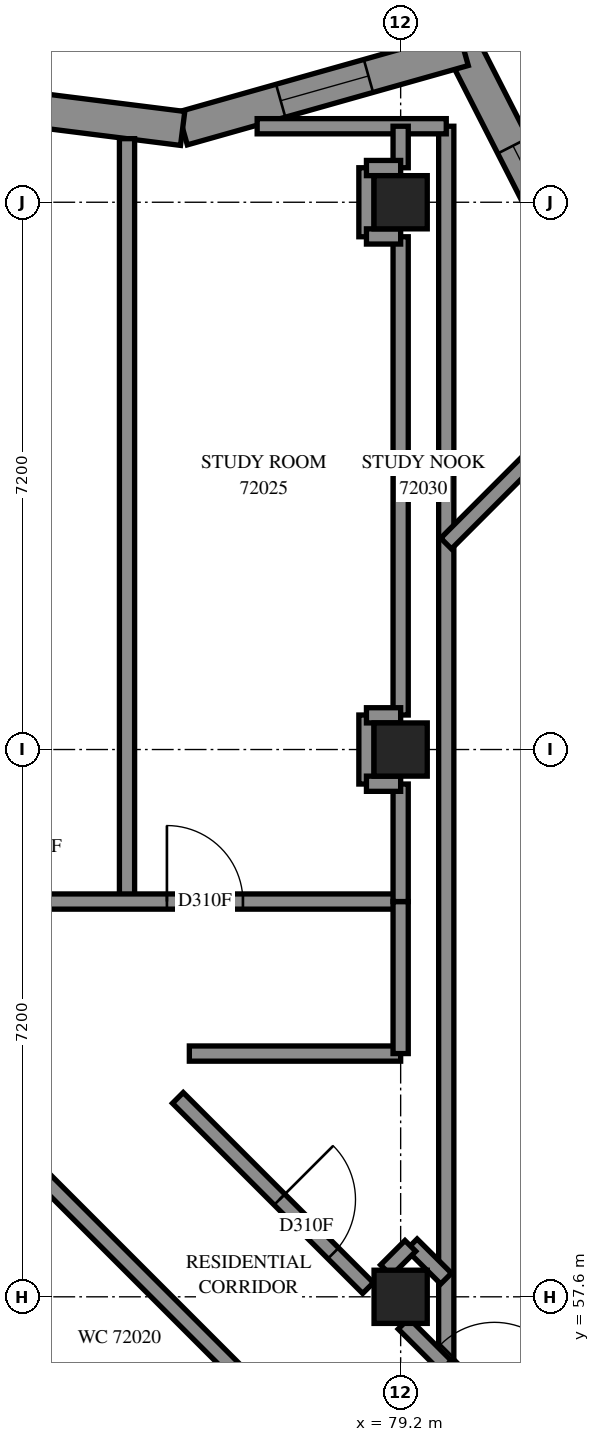
"""IFC4 building model, lengths in metres.
Left out: names, types, materials, properties, quantities, classifications, styles, units other than length and angle.
Written with IfcOpenShell. Run it as: python <this file> out.ifc"""

import sys

from ifc_helpers import new_model, si_unit, direction, frame, frame_2d, origin, origin_2d, place, context, subcontext, project, spatial, polyline, rectangle, outline, extrude, element, fill, save


model = new_model("IFC4")
c1 = context("Model", 3, precision=1e-05, world=origin(), true_north=direction((0.0, 1.0)))
c2 = subcontext(c1, "Body", "Model", "MODEL_VIEW")
j1 = project(units=[si_unit("LENGTHUNIT", "METRE"), si_unit("PLANEANGLEUNIT", "RADIAN")], contexts=[c1])
p1 = place(None, origin())
s1 = spatial("IfcSite", under=j1, at=p1, CompositionType="ELEMENT")
p2 = place(p1, origin())
s2 = spatial("IfcBuilding", under=s1, at=p2, CompositionType="ELEMENT")
p3 = place(p2, frame((0.0, 0.0, 264.2)))
s3 = spatial("IfcBuildingStorey", under=s2, at=p3, CompositionType="ELEMENT", Elevation=264.2)
for number, where, z_axis, x_axis in (
    (1, (79.2, 57.6, 0.0), (0.0, 0.0, 1.0), (1.0, 0.0, 0.0)),
    (2, (79.2, 64.8, 0.0), (0.0, 0.0, 1.0), (1.0, 0.0, 0.0)),
    (3, (79.2, 72.0, 0.0), (0.0, 0.0, 1.0), (1.0, 0.0, 0.0)),
):
    element("IfcColumn", number, at=place(p3, frame(where, z_axis=z_axis, x_axis=x_axis)), inside=s3, PredefinedType="COLUMN", context=c2, shape_type="SweptSolid", body=[
        extrude(rectangle(XDim=0.7, YDim=0.7, at=origin_2d()), origin(), (0.0, 0.0, 1.0), 3.1),
    ])
p4 = place(p3, frame((76.513, 49.231, -0.3), z_axis=(0.0, 0.0, 1.0), x_axis=(0.7071067812, 0.7071067812, 0.0)))
e4 = element("IfcWall", 4, at=p4, inside=s3, PredefinedType="SHEAR", context=c2, shape_type="SweptSolid", body=[
    extrude(rectangle(XDim=14.4, YDim=0.4, at=frame_2d((7.2, 0.0))), origin(), (0.0, 0.0, 1.0), 2.7),
])
p5 = place(p4, frame((4.55, 0.0, 0.3)))
e5 = element("IfcOpeningElement", 5, at=p5, cuts=e4, PredefinedType="OPENING", context=c2, shape_type="SweptSolid", body=[
    extrude(rectangle(XDim=1.1, YDim=2.1, at=frame_2d((0.55, 1.05))), frame((0.0, 0.21, 0.0), z_axis=(0.0, -1.0, 0.0), x_axis=(1.0, 0.0, 0.0)), (0.0, 0.0, 1.0), 0.42),
])
p6 = place(p4, frame((11.35, 0.0, 0.3)))
e6 = element("IfcOpeningElement", 6, at=p6, cuts=e4, PredefinedType="OPENING", context=c2, shape_type="SweptSolid", body=[
    extrude(rectangle(XDim=1.1, YDim=2.1, at=frame_2d((0.55, 1.05))), frame((0.0, 0.21, 0.0), z_axis=(0.0, -1.0, 0.0), x_axis=(1.0, 0.0, 0.0)), (0.0, 0.0, 1.0), 0.42),
])
p7 = place(p3, frame((81.561, 71.01, 0.0), z_axis=(0.0, 0.0, 1.0), x_axis=(-0.4543493723, 0.8908235784, 0.0)))
e7 = element("IfcWall", 7, at=p7, inside=s3, PredefinedType="SOLIDWALL", context=c2, shape_type="SweptSolid", body=[
    extrude(outline(polyline([(0.052, -0.225), (3.558, -0.225), (3.189, 0.225), (-0.052, 0.225), (0.052, -0.225)])), origin(), (0.0, 0.0, 1.0), 3.1),
])
p8 = place(p7, frame((0.746, 0.0, 0.45)))
e8 = element("IfcOpeningElement", 8, at=p8, cuts=e7, PredefinedType="OPENING", context=c2, shape_type="SweptSolid", body=[
    extrude(rectangle(XDim=1.2, YDim=2.55, at=frame_2d((0.6, 1.275))), frame((0.0, 0.235, 0.0), z_axis=(0.0, -1.0, 0.0), x_axis=(1.0, 0.0, 0.0)), (0.0, 0.0, 1.0), 0.47),
])
p9 = place(p3, frame((80.029, 74.015, 0.0), z_axis=(0.0, 0.0, 1.0), x_axis=(-0.9623447924, -0.2718317505, 0.0)))
e9 = element("IfcWall", 9, at=p9, inside=s3, PredefinedType="SOLIDWALL", context=c2, shape_type="SweptSolid", body=[
    extrude(outline(polyline([(-0.185, -0.225), (3.796, -0.225), (3.887, 0.225), (0.185, 0.225), (-0.185, -0.225)])), origin(), (0.0, 0.0, 1.0), 3.1),
])
p10 = place(p9, frame((1.301, 0.0, 0.45)))
e10 = element("IfcOpeningElement", 10, at=p10, cuts=e9, PredefinedType="OPENING", context=c2, shape_type="SweptSolid", body=[
    extrude(rectangle(XDim=1.2, YDim=2.55, at=frame_2d((0.6, 1.275))), frame((0.0, 0.235, 0.0), z_axis=(0.0, -1.0, 0.0), x_axis=(1.0, 0.0, 0.0)), (0.0, 0.0, 1.0), 0.47),
])
p11 = place(p3, frame((76.332, 72.971, 0.0), z_axis=(0.0, 0.0, 1.0), x_axis=(-0.9921783841, 0.1248280981, 0.0)))
e11 = element("IfcWall", 11, at=p11, inside=s3, PredefinedType="SOLIDWALL", context=c2, shape_type="SweptSolid", body=[
    extrude(outline(polyline([(0.046, -0.225), (3.906, -0.225), (3.85, 0.225), (-0.046, 0.225), (0.046, -0.225)])), origin(), (0.0, 0.0, 1.0), 3.1),
])
p12 = place(p11, frame((2.194, 0.0, 0.45)))
e12 = element("IfcOpeningElement", 12, at=p12, cuts=e11, PredefinedType="OPENING", context=c2, shape_type="SweptSolid", body=[
    extrude(rectangle(XDim=1.2, YDim=2.55, at=frame_2d((0.6, 1.275))), frame((0.0, 0.235, 0.0), z_axis=(0.0, -1.0, 0.0), x_axis=(1.0, 0.0, 0.0)), (0.0, 0.0, 1.0), 0.47),
])
p13 = place(p3, frame((79.8, 56.692, 0.0), z_axis=(0.0, 0.0, 1.0), x_axis=(0.0, 1.0, 0.0)))
e13 = element("IfcWall", 13, at=p13, inside=s3, PredefinedType="PARTITIONING", context=c2, shape_type="SweptSolid", body=[
    extrude(rectangle(XDim=16.308, YDim=0.2, at=frame_2d((8.154, 0.0))), origin(), (0.0, 0.0, 1.0), 3.1),
])
p14 = place(p3, frame((75.6, 62.8, 0.0), z_axis=(0.0, 0.0, 1.0), x_axis=(0.0, 1.0, 0.0)))
e14 = element("IfcWall", 14, at=p14, inside=s3, PredefinedType="PARTITIONING", context=c2, shape_type="SweptSolid", body=[
    extrude(rectangle(XDim=10.036, YDim=0.2, at=frame_2d((5.018, 0.0))), origin(), (0.0, 0.0, 1.0), 3.1),
])
p15 = place(p3, frame((80.332, 56.163, 0.0), z_axis=(0.0, 0.0, 1.0), x_axis=(0.7071067812, 0.7071067812, 0.0)))
e15 = element("IfcWall", 15, at=p15, inside=s3, PredefinedType="PARTITIONING", context=c2, shape_type="SweptSolid", body=[
    extrude(rectangle(XDim=9.198, YDim=0.2, at=frame_2d((4.599, 0.0))), origin(), (0.0, 0.0, 1.0), 3.1),
])
p16 = place(p15, frame((0.144, 0.0, 0.0)))
e16 = element("IfcOpeningElement", 16, at=p16, cuts=e15, PredefinedType="OPENING", context=c2, shape_type="SweptSolid", body=[
    extrude(rectangle(XDim=1.0, YDim=2.1, at=frame_2d((0.5, 1.05))), frame((0.0, 0.11, 0.0), z_axis=(0.0, -1.0, 0.0), x_axis=(1.0, 0.0, 0.0)), (0.0, 0.0, 1.0), 0.22),
])
p17 = place(p3, frame((79.2, 65.254, 0.0), z_axis=(0.0, 0.0, 1.0), x_axis=(0.0, 1.0, 0.0)))
e17 = element("IfcWall", 17, at=p17, inside=s3, PredefinedType="PARTITIONING", context=c2, shape_type="SweptSolid", body=[
    extrude(rectangle(XDim=6.292, YDim=0.2, at=frame_2d((3.146, 0.0))), origin(), (0.0, 0.0, 1.0), 3.1),
])
p18 = place(p3, frame((74.402, 62.8, 0.0), z_axis=(0.0, 0.0, 1.0), x_axis=(1.0, 0.0, 0.0)))
e18 = element("IfcWall", 18, at=p18, inside=s3, PredefinedType="PARTITIONING", context=c2, shape_type="SweptSolid", body=[
    extrude(rectangle(XDim=4.798, YDim=0.2, at=frame_2d((2.399, 0.0))), origin(), (0.0, 0.0, 1.0), 3.1),
])
p19 = place(p18, frame((1.723, 0.0, 0.0)))
e19 = element("IfcOpeningElement", 19, at=p19, cuts=e18, PredefinedType="OPENING", context=c2, shape_type="SweptSolid", body=[
    extrude(rectangle(XDim=1.0, YDim=2.1, at=frame_2d((0.5, 1.05))), frame((0.0, 0.11, 0.0), z_axis=(0.0, -1.0, 0.0), x_axis=(1.0, 0.0, 0.0)), (0.0, 0.0, 1.0), 0.22),
])
p20 = place(p3, frame((74.399, 59.259, 0.0), z_axis=(0.0, 0.0, 1.0), x_axis=(0.7071067812, -0.7071067812, 0.0)))
e20 = element("IfcWall", 20, at=p20, inside=s3, PredefinedType="PARTITIONING", context=c2, shape_type="SweptSolid", body=[
    extrude(rectangle(XDim=4.508, YDim=0.2, at=frame_2d((2.254, 0.0))), origin(), (0.0, 0.0, 1.0), 3.1),
])
p21 = place(p3, frame((79.798, 67.51, 0.0), z_axis=(0.0, 0.0, 1.0), x_axis=(0.7068343875, 0.70737907, 0.0)))
e21 = element("IfcWall", 21, at=p21, inside=s3, PredefinedType="PARTITIONING", context=c2, shape_type="SweptSolid", body=[
    extrude(rectangle(XDim=3.672, YDim=0.2, at=frame_2d((1.836, 0.0))), origin(), (0.0, 0.0, 1.0), 3.1),
])
p22 = place(p3, frame((76.269, 60.217, 0.0), z_axis=(0.0, 0.0, 1.0), x_axis=(0.7071067812, -0.7071067812, 0.0)))
e22 = element("IfcWall", 22, at=p22, inside=s3, PredefinedType="PARTITIONING", context=c2, shape_type="SweptSolid", body=[
    extrude(rectangle(XDim=3.538, YDim=0.2, at=frame_2d((1.769, 0.0))), origin(), (0.0, 0.0, 1.0), 3.1),
])
p23 = place(p22, frame((1.891, 0.0, 0.0)))
e23 = element("IfcOpeningElement", 23, at=p23, cuts=e22, PredefinedType="OPENING", context=c2, shape_type="SweptSolid", body=[
    extrude(rectangle(XDim=1.0, YDim=2.1, at=frame_2d((0.5, 1.05))), frame((0.0, 0.11, 0.0), z_axis=(0.0, -1.0, 0.0), x_axis=(1.0, 0.0, 0.0)), (0.0, 0.0, 1.0), 0.22),
])
p24 = place(p3, frame((76.42, 60.8, 0.0), z_axis=(0.0, 0.0, 1.0), x_axis=(1.0, 0.0, 0.0)))
e24 = element("IfcWall", 24, at=p24, inside=s3, PredefinedType="PARTITIONING", context=c2, shape_type="SweptSolid", body=[
    extrude(rectangle(XDim=2.78, YDim=0.2, at=frame_2d((1.39, 0.0))), origin(), (0.0, 0.0, 1.0), 3.1),
])
p25 = place(p3, frame((77.312, 73.0, 0.0), z_axis=(0.0, 0.0, 1.0), x_axis=(1.0, 0.0, 0.0)))
e25 = element("IfcWall", 25, at=p25, inside=s3, PredefinedType="PARTITIONING", context=c2, shape_type="SweptSolid", body=[
    extrude(rectangle(XDim=2.488, YDim=0.2, at=frame_2d((1.244, 0.0))), origin(), (0.0, 0.0, 1.0), 3.1),
])
p26 = place(p3, frame((79.2, 60.8, 0.0), z_axis=(0.0, 0.0, 1.0), x_axis=(0.0, 1.0, 0.0)))
e26 = element("IfcWall", 26, at=p26, inside=s3, PredefinedType="PARTITIONING", context=c2, shape_type="SweptSolid", body=[
    extrude(rectangle(XDim=2.0, YDim=0.2, at=frame_2d((1.0, 0.0))), origin(), (0.0, 0.0, 1.0), 3.1),
])
p27 = place(p3, frame((79.2, 62.8, 0.0), z_axis=(0.0, 0.0, 1.0), x_axis=(0.0, 1.0, 0.0)))
e27 = element("IfcWall", 27, at=p27, inside=s3, PredefinedType="PARTITIONING", context=c2, shape_type="SweptSolid", body=[
    extrude(rectangle(XDim=1.546, YDim=0.2, at=frame_2d((0.773, 0.0))), origin(), (0.0, 0.0, 1.0), 3.1),
])
for number, where, z_axis, x_axis in (
    (28, (78.75, 64.346, 0.0), (0.0, 0.0, 1.0), (0.0, 1.0, 0.0)),
    (29, (78.75, 71.546, 0.0), (0.0, 0.0, 1.0), (0.0, 1.0, 0.0)),
):
    element("IfcWall", number, at=place(p3, frame(where, z_axis=z_axis, x_axis=x_axis)), inside=s3, PredefinedType="PARTITIONING", context=c2, shape_type="SweptSolid", body=[
        extrude(rectangle(XDim=0.908, YDim=0.2, at=frame_2d((0.454, 0.0))), origin(), (0.0, 0.0, 1.0), 3.1),
    ])
p28 = place(p3, frame((79.239, 57.247, 0.0), z_axis=(0.0, 0.0, 1.0), x_axis=(0.7071067812, -0.7071067812, 0.0)))
e30 = element("IfcWall", 30, at=p28, inside=s3, PredefinedType="PARTITIONING", context=c2, shape_type="SweptSolid", body=[
    extrude(rectangle(XDim=0.789, YDim=0.2, at=frame_2d((0.395, 0.0))), origin(), (0.0, 0.0, 1.0), 3.1),
])
p29 = place(p3, frame((79.346, 58.29, 0.0), z_axis=(0.0, 0.0, 1.0), x_axis=(0.7086729034, -0.7055371826, 0.0)))
e31 = element("IfcWall", 31, at=p29, inside=s3, PredefinedType="PARTITIONING", context=c2, shape_type="SweptSolid", body=[
    extrude(rectangle(XDim=0.638, YDim=0.2, at=frame_2d((0.319, 0.0))), origin(), (0.0, 0.0, 1.0), 3.1),
])
p30 = place(p3, frame((79.797, 56.689, 0.0), z_axis=(0.0, 0.0, 1.0), x_axis=(0.7071067812, -0.7071067812, 0.0)))
e32 = element("IfcWall", 32, at=p30, inside=s3, PredefinedType="PARTITIONING", context=c2, shape_type="SweptSolid", body=[
    extrude(rectangle(XDim=0.551, YDim=0.2, at=frame_2d((0.276, 0.0))), origin(), (0.0, 0.0, 1.0), 3.1),
])
p31 = place(p3, frame((79.2, 72.454, 0.0), z_axis=(0.0, 0.0, 1.0), x_axis=(0.0, 1.0, 0.0)))
e33 = element("IfcWall", 33, at=p31, inside=s3, PredefinedType="PARTITIONING", context=c2, shape_type="SweptSolid", body=[
    extrude(rectangle(XDim=0.546, YDim=0.2, at=frame_2d((0.273, 0.0))), origin(), (0.0, 0.0, 1.0), 3.1),
])
p32 = place(p3, frame((79.007, 57.949, 0.0), z_axis=(0.0, 0.0, 1.0), x_axis=(0.7071067812, 0.7071067812, 0.0)))
e34 = element("IfcWall", 34, at=p32, inside=s3, PredefinedType="PARTITIONING", context=c2, shape_type="SweptSolid", body=[
    extrude(rectangle(XDim=0.454, YDim=0.2, at=frame_2d((0.227, 0.0))), origin(), (0.0, 0.0, 1.0), 3.1),
])
for number, where, z_axis, x_axis in (
    (35, (78.75, 71.55, 0.0), (0.0, 0.0, 1.0), (1.0, 0.0, 0.0)),
    (36, (78.75, 72.45, 0.0), (0.0, 0.0, 1.0), (1.0, 0.0, 0.0)),
    (37, (78.75, 65.25, 0.0), (0.0, 0.0, 1.0), (1.0, 0.0, 0.0)),
    (38, (78.75, 64.35, 0.0), (0.0, 0.0, 1.0), (1.0, 0.0, 0.0)),
):
    element("IfcWall", number, at=place(p3, frame(where, z_axis=z_axis, x_axis=x_axis)), inside=s3, PredefinedType="PARTITIONING", context=c2, shape_type="SweptSolid", body=[
        extrude(rectangle(XDim=0.45, YDim=0.2, at=frame_2d((0.225, 0.0))), origin(), (0.0, 0.0, 1.0), 3.1),
    ])
p33 = place(p8, origin())
e39 = element("IfcWindow", 39, at=p33, inside=s3, PartitioningType="SINGLE_PANEL", PredefinedType="WINDOW", context=c2, shape_type="SweptSolid", body=[
    extrude(rectangle(XDim=1.2, YDim=2.55, at=frame_2d((0.6, 1.275))), frame((0.0, 0.205, 0.0), z_axis=(0.0, -1.0, 0.0), x_axis=(1.0, 0.0, 0.0)), (0.0, 0.0, 1.0), 0.06),
])
fill(e8, e39)
p34 = place(p10, origin())
e40 = element("IfcWindow", 40, at=p34, inside=s3, PartitioningType="SINGLE_PANEL", PredefinedType="WINDOW", context=c2, shape_type="SweptSolid", body=[
    extrude(rectangle(XDim=1.2, YDim=2.55, at=frame_2d((0.6, 1.275))), frame((0.0, 0.205, 0.0), z_axis=(0.0, -1.0, 0.0), x_axis=(1.0, 0.0, 0.0)), (0.0, 0.0, 1.0), 0.06),
])
fill(e10, e40)
p35 = place(p19, origin())
e41 = element("IfcDoor", 41, at=p35, inside=s3, OperationType="SINGLE_SWING_LEFT", PredefinedType="DOOR", context=c2, shape_type="SweptSolid", body=[
    extrude(rectangle(XDim=1.0, YDim=2.1, at=frame_2d((0.5, 1.05))), frame((0.0, 0.025, 0.0), z_axis=(0.0, -1.0, 0.0), x_axis=(1.0, 0.0, 0.0)), (0.0, 0.0, 1.0), 0.05),
])
fill(e19, e41)
p36 = place(p23, origin())
e42 = element("IfcDoor", 42, at=p36, inside=s3, OperationType="SINGLE_SWING_LEFT", PredefinedType="DOOR", context=c2, shape_type="SweptSolid", body=[
    extrude(rectangle(XDim=1.0, YDim=2.1, at=frame_2d((0.5, 1.05))), frame((0.0, 0.025, 0.0), z_axis=(0.0, -1.0, 0.0), x_axis=(1.0, 0.0, 0.0)), (0.0, 0.0, 1.0), 0.05),
])
fill(e23, e42)
p37 = place(p16, origin())
e43 = element("IfcDoor", 43, at=p37, inside=s3, OperationType="SINGLE_SWING_RIGHT", PredefinedType="DOOR", context=c2, shape_type="SweptSolid", body=[
    extrude(rectangle(XDim=1.0, YDim=2.1, at=frame_2d((0.5, 1.05))), frame((0.0, 0.025, 0.0), z_axis=(0.0, -1.0, 0.0), x_axis=(1.0, 0.0, 0.0)), (0.0, 0.0, 1.0), 0.05),
])
fill(e16, e43)
save(model, sys.argv[1])
